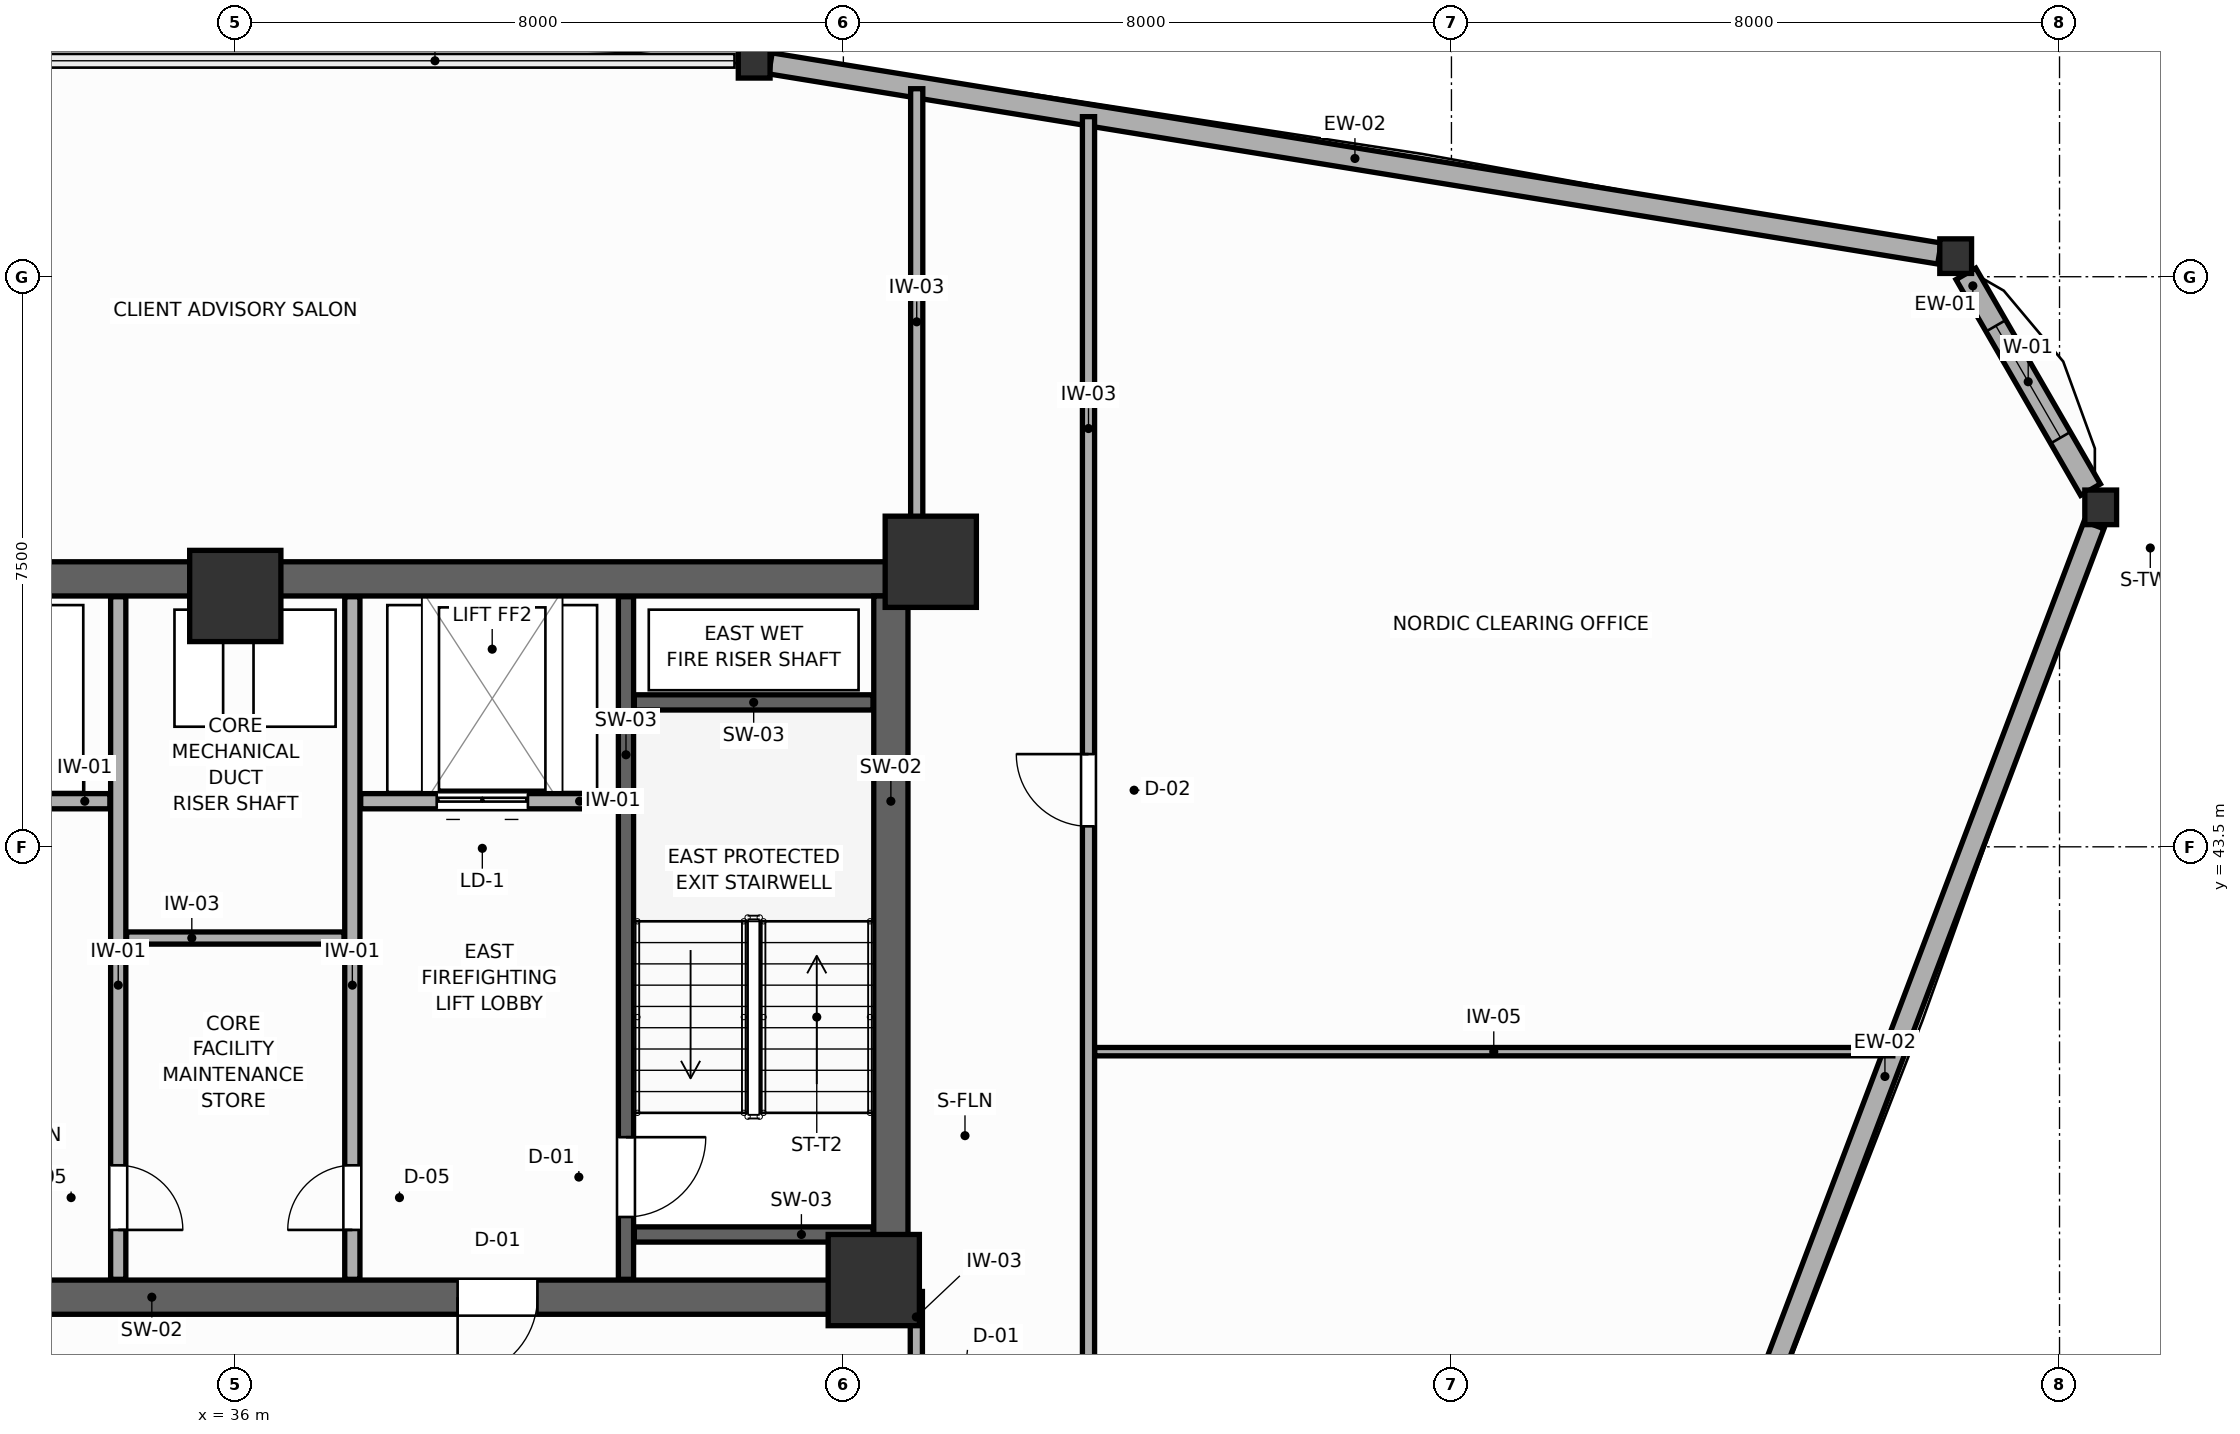
"""IFC4 building model, lengths in metres.
Left out: names, types, materials, properties, quantities, classifications, styles, units other than length and angle.
Written with IfcOpenShell. Run it as: python <this file> out.ifc"""

import sys

from ifc_helpers import new_model, si_unit, direction, frame, frame_2d, origin, origin_2d, place, context, subcontext, project, spatial, rectangle, i_section, extrude, source, transform, mapped, element, fill, save


model = new_model("IFC4")
c1 = context("Model", 3, precision=1e-05, world=origin(), true_north=direction((0.0, 1.0)))
c2 = subcontext(c1, "Body", "Model", "MODEL_VIEW")
j1 = project(units=[si_unit("LENGTHUNIT", "METRE"), si_unit("PLANEANGLEUNIT", "RADIAN")], contexts=[c1])
p1 = place(None, origin())
s1 = spatial("IfcSite", under=j1, at=p1, CompositionType="ELEMENT")
p2 = place(p1, origin())
s2 = spatial("IfcBuilding", under=s1, at=p2, CompositionType="ELEMENT")
p3 = place(p2, frame((0.0, 0.0, 127.8)))
s3 = spatial("IfcBuildingStorey", under=s2, at=p3, CompositionType="ELEMENT", Elevation=127.8)
p4 = place(p3, frame((27.15, 47.025, 0.0), z_axis=(0.0, 0.0, 1.0), x_axis=(1.0, 0.0, 0.0)))
e1 = element("IfcWall", 1, at=p4, inside=s3, PredefinedType="SHEAR", context=c2, shape_type="SweptSolid", body=[
    extrude(rectangle(XDim=17.7, YDim=0.45, at=frame_2d((8.85, 0.0))), origin(), (0.0, 0.0, 1.0), 3.6),
])
p5 = place(p3, frame((27.15, 37.575, 0.0), z_axis=(0.0, 0.0, 1.0), x_axis=(1.0, 0.0, 0.0)))
e2 = element("IfcWall", 2, at=p5, inside=s3, PredefinedType="SHEAR", context=c2, shape_type="SweptSolid", body=[
    extrude(rectangle(XDim=17.7, YDim=0.45, at=frame_2d((8.85, 0.0))), origin(), (0.0, 0.0, 1.0), 3.6),
])
p6 = place(p5, frame((4.875, 0.0, 0.0)))
e3 = element("IfcOpeningElement", 3, at=p6, cuts=e2, PredefinedType="OPENING", context=c2, shape_type="SweptSolid", body=[
    extrude(rectangle(XDim=1.05, YDim=2.1, at=frame_2d((0.525, 1.05))), frame((0.0, 0.235, 0.0), z_axis=(0.0, -1.0, 0.0), x_axis=(1.0, 0.0, 0.0)), (0.0, 0.0, 1.0), 0.47),
])
p7 = place(p5, frame((11.775, 0.0, 0.0)))
e4 = element("IfcOpeningElement", 4, at=p7, cuts=e2, PredefinedType="OPENING", context=c2, shape_type="SweptSolid", body=[
    extrude(rectangle(XDim=1.05, YDim=2.1, at=frame_2d((0.525, 1.05))), frame((0.0, 0.235, 0.0), z_axis=(0.0, -1.0, 0.0), x_axis=(1.0, 0.0, 0.0)), (0.0, 0.0, 1.0), 0.47),
])
p8 = place(p3, frame((44.625, 37.8, 0.0), z_axis=(0.0, 0.0, 1.0), x_axis=(0.0, 1.0, 0.0)))
e5 = element("IfcWall", 5, at=p8, inside=s3, PredefinedType="SHEAR", context=c2, shape_type="SweptSolid", body=[
    extrude(rectangle(XDim=9.0, YDim=0.45, at=frame_2d((4.5, 0.0))), origin(), (0.0, 0.0, 1.0), 3.6),
])
m1 = source(origin(), c2, "Body", "SweptSolid", [
    extrude(rectangle(XDim=1.2, YDim=1.2, at=origin_2d()), origin(), (0.0, 0.0, 1.0), 3.6),
])
for number, where, z_axis, x_axis in (
    (6, (45.15, 47.25, 0.0), (0.0, 0.0, 1.0), (1.0, 0.0, 0.0)),
    (7, (44.4, 37.8, 0.0), (0.0, 0.0, 1.0), (1.0, 0.0, 0.0)),
    (8, (36.0, 46.8, 0.0), (0.0, 0.0, 1.0), (1.0, 0.0, 0.0)),
):
    element("IfcColumn", number, at=place(p3, frame(where, z_axis=z_axis, x_axis=x_axis)), inside=s3, PredefinedType="COLUMN", context=c2, shape_type="MappedRepresentation", body=[
        mapped(m1, transform((0.0, 0.0, 0.0), scale=1.0)),
    ])
m2 = source(origin(), c2, "Body", "SweptSolid", [
    extrude(i_section(OverallWidth=0.418, OverallDepth=0.455, WebThickness=0.039, FlangeThickness=0.063, FilletRadius=0.015, at=origin_2d()), origin(), (0.0, 0.0, 1.0), 3.6),
])
for number, where, z_axis, x_axis in (
    (9, (60.542, 47.966, 0.0), (0.0, 0.0, 1.0), (1.0, 0.0, 0.0)),
    (10, (58.634, 51.271, 0.0), (0.0, 0.0, 1.0), (1.0, 0.0, 0.0)),
    (11, (42.827, 53.841, 0.0), (0.0, 0.0, 1.0), (1.0, 0.0, 0.0)),
):
    element("IfcColumn", number, at=place(p3, frame(where, z_axis=z_axis, x_axis=x_axis)), inside=s3, PredefinedType="COLUMN", context=c2, shape_type="MappedRepresentation", body=[
        mapped(m2, transform((0.0, 0.0, 0.0), scale=1.0)),
    ])
p9 = place(p3, frame((60.408, 48.198, 0.0), z_axis=(0.0, 0.0, 1.0), x_axis=(-0.500014611105, 0.866016967894, 0.0)))
e12 = element("IfcWall", 12, at=p9, inside=s3, PredefinedType="SOLIDWALL", context=c2, shape_type="SweptSolid", body=[
    extrude(rectangle(XDim=3.279, YDim=0.3, at=frame_2d((1.64, 0.0))), origin(), (0.0, 0.0, 1.0), 2.86),
])
p10 = place(p9, frame((0.79, 0.0, 0.75)))
e13 = element("IfcOpeningElement", 13, at=p10, cuts=e12, PredefinedType="OPENING", context=c2, shape_type="SweptSolid", body=[
    extrude(rectangle(XDim=1.7, YDim=1.75, at=frame_2d((0.85, 0.875))), frame((0.0, 0.16, 0.0), z_axis=(0.0, -1.0, 0.0), x_axis=(1.0, 0.0, 0.0)), (0.0, 0.0, 1.0), 0.32),
])
p11 = place(p3, frame((58.42, 51.306, 0.0), z_axis=(0.0, 0.0, 1.0), x_axis=(-0.987036263752, 0.160497395736, 0.0)))
e14 = element("IfcWall", 14, at=p11, inside=s3, PredefinedType="SOLIDWALL", context=c2, shape_type="SweptSolid", body=[
    extrude(rectangle(XDim=15.581, YDim=0.28, at=frame_2d((7.791, 0.0))), origin(), (0.0, 0.0, 1.0), 2.86),
])
p12 = place(p3, frame((54.952, 33.224, 0.0), z_axis=(0.0, 0.0, 1.0), x_axis=(0.354519532047, 0.935048609109, 0.0)))
e15 = element("IfcWall", 15, at=p12, inside=s3, PredefinedType="SOLIDWALL", context=c2, shape_type="SweptSolid", body=[
    extrude(rectangle(XDim=15.517, YDim=0.28, at=frame_2d((7.759, 0.0))), origin(), (0.0, 0.0, 1.0), 2.86),
])
p13 = place(p3, frame((41.14, 37.81, 0.0), z_axis=(0.0, 0.0, 1.0), x_axis=(0.0, 1.0, 0.0)))
e16 = element("IfcWall", 16, at=p13, inside=s3, PredefinedType="SHEAR", context=c2, shape_type="SweptSolid", body=[
    extrude(rectangle(XDim=8.98, YDim=0.2, at=frame_2d((4.49, 0.0))), origin(), (0.0, 0.0, 1.0), 3.6),
])
p14 = place(p13, frame((0.82, 0.0, 0.0)))
e17 = element("IfcOpeningElement", 17, at=p14, cuts=e16, PredefinedType="OPENING", context=c2, shape_type="SweptSolid", body=[
    extrude(rectangle(XDim=1.05, YDim=2.1, at=frame_2d((0.525, 1.05))), frame((0.0, 0.11, 0.0), z_axis=(0.0, -1.0, 0.0), x_axis=(1.0, 0.0, 0.0)), (0.0, 0.0, 1.0), 0.22),
])
for number, where, z_axis, x_axis in (
    (18, (41.25, 45.4, 0.0), (0.0, 0.0, 1.0), (1.0, 0.0, 0.0)),
    (19, (41.25, 38.4, 0.0), (0.0, 0.0, 1.0), (1.0, 0.0, 0.0)),
):
    element("IfcWall", number, at=place(p3, frame(where, z_axis=z_axis, x_axis=x_axis)), inside=s3, PredefinedType="SHEAR", context=c2, shape_type="SweptSolid", body=[
        extrude(rectangle(XDim=3.14, YDim=0.2, at=frame_2d((1.57, 0.0))), origin(), (0.0, 0.0, 1.0), 3.6),
    ])
p15 = place(p3, frame((30.97, 44.1, 0.0), z_axis=(0.0, 0.0, 1.0), x_axis=(1.0, 0.0, 0.0)))
e20 = element("IfcWall", 20, at=p15, inside=s3, PredefinedType="PARTITIONING", context=c2, shape_type="SweptSolid", body=[
    extrude(rectangle(XDim=3.38, YDim=0.2, at=frame_2d((1.69, 0.0))), origin(), (0.0, 0.0, 1.0), 3.26),
])
p16 = place(p15, frame((0.9, 0.0, 0.0)))
e21 = element("IfcOpeningElement", 21, at=p16, cuts=e20, PredefinedType="OPENING", context=c2, shape_type="SweptSolid", body=[
    extrude(rectangle(XDim=1.2, YDim=2.1, at=frame_2d((0.6, 1.05))), frame((0.0, 0.11, 0.0), z_axis=(0.0, -1.0, 0.0), x_axis=(1.0, 0.0, 0.0)), (0.0, 0.0, 1.0), 0.22),
])
p17 = place(p3, frame((37.65, 44.1, 0.0), z_axis=(0.0, 0.0, 1.0), x_axis=(1.0, 0.0, 0.0)))
e22 = element("IfcWall", 22, at=p17, inside=s3, PredefinedType="PARTITIONING", context=c2, shape_type="SweptSolid", body=[
    extrude(rectangle(XDim=3.38, YDim=0.2, at=frame_2d((1.69, 0.0))), origin(), (0.0, 0.0, 1.0), 3.26),
])
p18 = place(p17, frame((1.0, 0.0, 0.0)))
e23 = element("IfcOpeningElement", 23, at=p18, cuts=e22, PredefinedType="OPENING", context=c2, shape_type="SweptSolid", body=[
    extrude(rectangle(XDim=1.2, YDim=2.1, at=frame_2d((0.6, 1.05))), frame((0.0, 0.11, 0.0), z_axis=(0.0, -1.0, 0.0), x_axis=(1.0, 0.0, 0.0)), (0.0, 0.0, 1.0), 0.22),
])
p19 = place(p3, frame((34.46, 37.81, 0.0), z_axis=(0.0, 0.0, 1.0), x_axis=(0.0, 1.0, 0.0)))
e24 = element("IfcWall", 24, at=p19, inside=s3, PredefinedType="PARTITIONING", context=c2, shape_type="SweptSolid", body=[
    extrude(rectangle(XDim=8.98, YDim=0.2, at=frame_2d((4.49, 0.0))), origin(), (0.0, 0.0, 1.0), 3.26),
])
p20 = place(p19, frame((0.65, 0.0, 0.0)))
e25 = element("IfcOpeningElement", 25, at=p20, cuts=e24, PredefinedType="OPENING", context=c2, shape_type="SweptSolid", body=[
    extrude(rectangle(XDim=0.85, YDim=2.05, at=frame_2d((0.425, 1.025))), frame((0.0, 0.11, 0.0), z_axis=(0.0, -1.0, 0.0), x_axis=(1.0, 0.0, 0.0)), (0.0, 0.0, 1.0), 0.22),
])
p21 = place(p3, frame((37.54, 37.81, 0.0), z_axis=(0.0, 0.0, 1.0), x_axis=(0.0, 1.0, 0.0)))
e26 = element("IfcWall", 26, at=p21, inside=s3, PredefinedType="PARTITIONING", context=c2, shape_type="SweptSolid", body=[
    extrude(rectangle(XDim=8.98, YDim=0.2, at=frame_2d((4.49, 0.0))), origin(), (0.0, 0.0, 1.0), 3.26),
])
p22 = place(p21, frame((0.65, 0.0, 0.0)))
e27 = element("IfcOpeningElement", 27, at=p22, cuts=e26, PredefinedType="OPENING", context=c2, shape_type="SweptSolid", body=[
    extrude(rectangle(XDim=0.85, YDim=2.05, at=frame_2d((0.425, 1.025))), frame((0.0, 0.11, 0.0), z_axis=(0.0, -1.0, 0.0), x_axis=(1.0, 0.0, 0.0)), (0.0, 0.0, 1.0), 0.22),
])
p23 = place(p3, frame((34.57, 42.3, 0.0), z_axis=(0.0, 0.0, 1.0), x_axis=(1.0, 0.0, 0.0)))
e28 = element("IfcWall", 28, at=p23, inside=s3, PredefinedType="PARTITIONING", context=c2, shape_type="SweptSolid", body=[
    extrude(rectangle(XDim=2.86, YDim=0.16, at=frame_2d((1.43, 0.0))), origin(), (0.0, 0.0, 1.0), 3.26),
])
p24 = place(p3, frame((44.96, 35.0, 0.0), z_axis=(0.0, 0.0, 1.0), x_axis=(0.0, 1.0, 0.0)))
e29 = element("IfcWall", 29, at=p24, inside=s3, PredefinedType="PARTITIONING", context=c2, shape_type="SweptSolid", body=[
    extrude(rectangle(XDim=2.65, YDim=0.16, at=frame_2d((1.325, 0.0))), origin(), (0.0, 0.0, 1.0), 3.26),
])
p25 = place(p24, frame((0.75, 0.0, 0.0)))
e30 = element("IfcOpeningElement", 30, at=p25, cuts=e29, PredefinedType="OPENING", context=c2, shape_type="SweptSolid", body=[
    extrude(rectangle(XDim=1.05, YDim=2.1, at=frame_2d((0.525, 1.05))), frame((0.0, 0.09, 0.0), z_axis=(0.0, -1.0, 0.0), x_axis=(1.0, 0.0, 0.0)), (0.0, 0.0, 1.0), 0.18),
])
p26 = place(p3, frame((47.225, 32.31, 0.0), z_axis=(0.0, 0.0, 1.0), x_axis=(0.0, 1.0, 0.0)))
e31 = element("IfcWall", 31, at=p26, inside=s3, PredefinedType="PARTITIONING", context=c2, shape_type="SweptSolid", body=[
    extrude(rectangle(XDim=20.796, YDim=0.16, at=frame_2d((10.398, 0.0))), origin(), (0.0, 0.0, 1.0), 3.26),
])
p27 = place(p26, frame((3.082, 0.0, 0.0)))
e32 = element("IfcOpeningElement", 32, at=p27, cuts=e31, PredefinedType="OPENING", context=c2, shape_type="SweptSolid", body=[
    extrude(rectangle(XDim=0.95, YDim=2.05, at=frame_2d((0.475, 1.025))), frame((0.0, 0.09, 0.0), z_axis=(0.0, -1.0, 0.0), x_axis=(1.0, 0.0, 0.0)), (0.0, 0.0, 1.0), 0.18),
])
p28 = place(p26, frame((11.46, 0.0, 0.0)))
e33 = element("IfcOpeningElement", 33, at=p28, cuts=e31, PredefinedType="OPENING", context=c2, shape_type="SweptSolid", body=[
    extrude(rectangle(XDim=0.95, YDim=2.05, at=frame_2d((0.475, 1.025))), frame((0.0, 0.09, 0.0), z_axis=(0.0, -1.0, 0.0), x_axis=(1.0, 0.0, 0.0)), (0.0, 0.0, 1.0), 0.18),
])
p29 = place(p3, frame((44.965, 47.34, 0.0), z_axis=(0.0, 0.0, 1.0), x_axis=(0.0, 1.0, 0.0)))
e34 = element("IfcWall", 34, at=p29, inside=s3, PredefinedType="PARTITIONING", context=c2, shape_type="SweptSolid", body=[
    extrude(rectangle(XDim=6.133, YDim=0.16, at=frame_2d((3.067, 0.0))), origin(), (0.0, 0.0, 1.0), 3.26),
])
p30 = place(p3, frame((47.307, 40.805, 0.0), z_axis=(0.0, 0.0, 1.0), x_axis=(1.0, 0.0, 0.0)))
e35 = element("IfcWall", 35, at=p30, inside=s3, PredefinedType="MOVABLE", context=c2, shape_type="SweptSolid", body=[
    extrude(rectangle(XDim=10.5, YDim=0.11, at=frame_2d((5.25, 0.0))), origin(), (0.0, 0.0, 1.0), 3.26),
])
p31 = place(p10, origin())
e36 = element("IfcWindow", 36, at=p31, inside=s3, PartitioningType="SINGLE_PANEL", PredefinedType="WINDOW", context=c2, shape_type="SweptSolid", body=[
    extrude(rectangle(XDim=1.7, YDim=1.75, at=frame_2d((0.85, 0.875))), frame((0.0, 0.03, 0.0), z_axis=(0.0, -1.0, 0.0), x_axis=(1.0, 0.0, 0.0)), (0.0, 0.0, 1.0), 0.06),
])
fill(e13, e36)
p32 = place(p14, frame((1.05, 0.0, 0.0), z_axis=(0.0, 0.0, 1.0), x_axis=(-1.0, 0.0, 0.0)))
e37 = element("IfcDoor", 37, at=p32, inside=s3, OperationType="SINGLE_SWING_LEFT", PredefinedType="DOOR", context=c2, shape_type="SweptSolid", body=[
    extrude(rectangle(XDim=1.05, YDim=2.1, at=frame_2d((0.525, 1.05))), frame((0.0, 0.025, 0.0), z_axis=(0.0, -1.0, 0.0), x_axis=(1.0, 0.0, 0.0)), (0.0, 0.0, 1.0), 0.05),
])
fill(e17, e37)
p33 = place(p18, origin())
e38 = element("IfcDoor", 38, at=p33, inside=s3, OperationType="DOUBLE_DOOR_SLIDING", PredefinedType="DOOR", context=c2, shape_type="SweptSolid", body=[
    extrude(rectangle(XDim=1.2, YDim=2.1, at=frame_2d((0.6, 1.05))), frame((0.0, 0.025, 0.0), z_axis=(0.0, -1.0, 0.0), x_axis=(1.0, 0.0, 0.0)), (0.0, 0.0, 1.0), 0.05),
])
fill(e23, e38)
p34 = place(p20, frame((0.85, 0.0, 0.0), z_axis=(0.0, 0.0, 1.0), x_axis=(-1.0, 0.0, 0.0)))
e39 = element("IfcDoor", 39, at=p34, inside=s3, OperationType="SINGLE_SWING_RIGHT", PredefinedType="DOOR", context=c2, shape_type="SweptSolid", body=[
    extrude(rectangle(XDim=0.85, YDim=2.05, at=frame_2d((0.425, 1.025))), frame((0.0, 0.025, 0.0), z_axis=(0.0, -1.0, 0.0), x_axis=(1.0, 0.0, 0.0)), (0.0, 0.0, 1.0), 0.05),
])
fill(e25, e39)
p35 = place(p22, origin())
e40 = element("IfcDoor", 40, at=p35, inside=s3, OperationType="SINGLE_SWING_LEFT", PredefinedType="DOOR", context=c2, shape_type="SweptSolid", body=[
    extrude(rectangle(XDim=0.85, YDim=2.05, at=frame_2d((0.425, 1.025))), frame((0.0, 0.025, 0.0), z_axis=(0.0, -1.0, 0.0), x_axis=(1.0, 0.0, 0.0)), (0.0, 0.0, 1.0), 0.05),
])
fill(e27, e40)
p36 = place(p28, origin())
e41 = element("IfcDoor", 41, at=p36, inside=s3, OperationType="SINGLE_SWING_RIGHT", PredefinedType="DOOR", context=c2, shape_type="SweptSolid", body=[
    extrude(rectangle(XDim=0.95, YDim=2.05, at=frame_2d((0.475, 1.025))), frame((0.0, 0.025, 0.0), z_axis=(0.0, -1.0, 0.0), x_axis=(1.0, 0.0, 0.0)), (0.0, 0.0, 1.0), 0.05),
])
fill(e33, e41)
p37 = place(p7, frame((1.05, 0.0, 0.0), z_axis=(0.0, 0.0, 1.0), x_axis=(-1.0, 0.0, 0.0)))
e42 = element("IfcDoor", 42, at=p37, inside=s3, OperationType="SINGLE_SWING_RIGHT", PredefinedType="DOOR", context=c2, shape_type="SweptSolid", body=[
    extrude(rectangle(XDim=1.05, YDim=2.1, at=frame_2d((0.525, 1.05))), frame((0.0, 0.025, 0.0), z_axis=(0.0, -1.0, 0.0), x_axis=(1.0, 0.0, 0.0)), (0.0, 0.0, 1.0), 0.05),
])
fill(e4, e42)
save(model, sys.argv[1])
